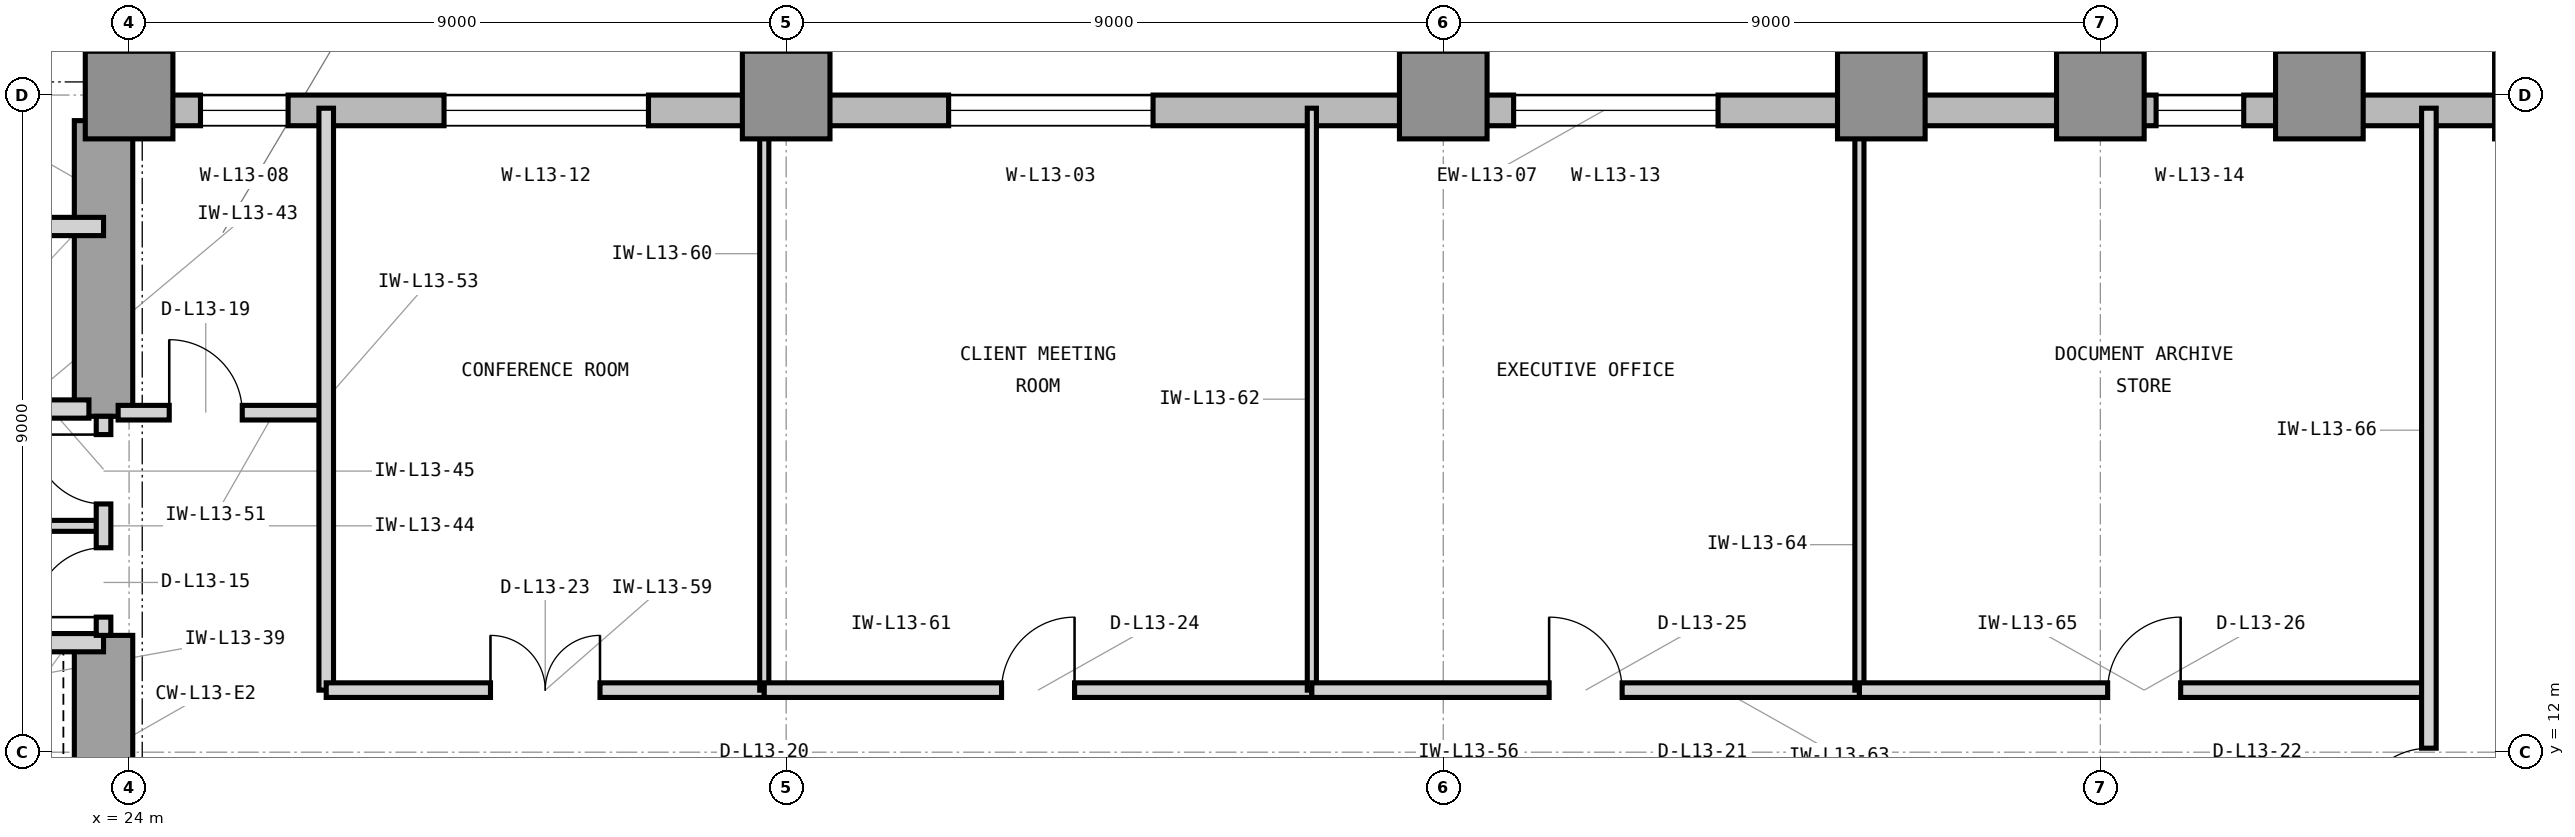
"""IFC4 building model, lengths in metres.
Left out: names, types, materials, properties, quantities, classifications, styles, units other than length and angle.
Written with IfcOpenShell. Run it as: python <this file> out.ifc"""

import sys

from ifc_helpers import new_model, si_unit, direction, frame, frame_2d, origin, origin_2d, place, context, subcontext, project, spatial, rectangle, extrude, element, fill, save


model = new_model("IFC4")
c1 = context("Model", 3, precision=1e-05, world=origin(), true_north=direction((0.0, 1.0)))
c2 = subcontext(c1, "Body", "Model", "MODEL_VIEW")
j1 = project(units=[si_unit("LENGTHUNIT", "METRE"), si_unit("PLANEANGLEUNIT", "RADIAN")], contexts=[c1])
p1 = place(None, origin())
s1 = spatial("IfcSite", under=j1, at=p1, CompositionType="ELEMENT")
p2 = place(p1, origin())
s2 = spatial("IfcBuilding", under=s1, at=p2, CompositionType="ELEMENT")
p3 = place(p2, frame((0.0, 0.0, 59.4)))
s3 = spatial("IfcBuildingStorey", under=s2, at=p3, CompositionType="ELEMENT", Elevation=59.4)
p4 = place(p3, frame((23.65, 10.4, 0.0), z_axis=(0.0, 0.0, 1.0), x_axis=(0.0, 1.0, 0.0)))
e1 = element("IfcWall", 1, at=p4, inside=s3, PredefinedType="SHEAR", context=c2, shape_type="SweptSolid", body=[
    extrude(rectangle(XDim=3.2, YDim=0.8, at=frame_2d((1.6, 0.0))), origin(), (0.0, 0.0, 1.0), 4.2),
])
p5 = place(p3, frame((23.65, 16.6, 0.0), z_axis=(0.0, 0.0, 1.0), x_axis=(0.0, 1.0, 0.0)))
e2 = element("IfcWall", 2, at=p5, inside=s3, PredefinedType="SHEAR", context=c2, shape_type="SweptSolid", body=[
    extrude(rectangle(XDim=4.05, YDim=0.8, at=frame_2d((2.025, 0.0))), origin(), (0.0, 0.0, 1.0), 4.2),
])
for number, where, z_axis, x_axis in (
    (3, (24.0, 21.0, 0.0), (0.0, 0.0, 1.0), (1.0, 0.0, 0.0)),
    (4, (33.0, 21.0, 0.0), (0.0, 0.0, 1.0), (1.0, 0.0, 0.0)),
    (5, (42.0, 21.0, 0.0), (0.0, 0.0, 1.0), (1.0, 0.0, 0.0)),
    (6, (48.0, 21.0, 0.0), (0.0, 0.0, 1.0), (1.0, 0.0, 0.0)),
    (7, (51.0, 21.0, 0.0), (0.0, 0.0, 1.0), (1.0, 0.0, 0.0)),
    (8, (54.0, 21.0, 0.0), (0.0, 0.0, 1.0), (1.0, 0.0, 0.0)),
    (9, (57.0, 21.0, 0.0), (0.0, 0.0, 1.0), (1.0, 0.0, 0.0)),
):
    element("IfcColumn", number, at=place(p3, frame(where, z_axis=z_axis, x_axis=x_axis)), inside=s3, PredefinedType="COLUMN", context=c2, shape_type="SweptSolid", body=[
        extrude(rectangle(XDim=1.2, YDim=1.2, at=origin_2d()), origin(), (0.0, 0.0, 1.0), 4.2),
    ])
p6 = place(p3, frame((64.4, 20.79, 0.0), z_axis=(0.0, 0.0, 1.0), x_axis=(-1.0, 0.0, 0.0)))
e10 = element("IfcWall", 10, at=p6, inside=s3, PredefinedType="STANDARD", context=c2, shape_type="SweptSolid", body=[
    extrude(rectangle(XDim=40.4, YDim=0.42, at=frame_2d((20.2, 0.0))), origin(), (0.0, 0.0, 1.0), 3.98),
])
p7 = place(p6, frame((26.375, 0.0, 0.85)))
e11 = element("IfcOpeningElement", 11, at=p7, cuts=e10, PredefinedType="OPENING", context=c2, shape_type="SweptSolid", body=[
    extrude(rectangle(XDim=2.8, YDim=2.45, at=frame_2d((1.4, 1.225))), frame((0.0, 0.22, 0.0), z_axis=(0.0, -1.0, 0.0), x_axis=(1.0, 0.0, 0.0)), (0.0, 0.0, 1.0), 0.44),
])
p8 = place(p6, frame((38.222, 0.0, 0.85)))
e12 = element("IfcOpeningElement", 12, at=p8, cuts=e10, PredefinedType="OPENING", context=c2, shape_type="SweptSolid", body=[
    extrude(rectangle(XDim=1.2, YDim=2.45, at=frame_2d((0.6, 1.225))), frame((0.0, 0.22, 0.0), z_axis=(0.0, -1.0, 0.0), x_axis=(1.0, 0.0, 0.0)), (0.0, 0.0, 1.0), 0.44),
])
p9 = place(p6, frame((33.286, 0.0, 0.85)))
e13 = element("IfcOpeningElement", 13, at=p9, cuts=e10, PredefinedType="OPENING", context=c2, shape_type="SweptSolid", body=[
    extrude(rectangle(XDim=2.8, YDim=2.45, at=frame_2d((1.4, 1.225))), frame((0.0, 0.22, 0.0), z_axis=(0.0, -1.0, 0.0), x_axis=(1.0, 0.0, 0.0)), (0.0, 0.0, 1.0), 0.44),
])
p10 = place(p6, frame((18.636, 0.0, 0.85)))
e14 = element("IfcOpeningElement", 14, at=p10, cuts=e10, PredefinedType="OPENING", context=c2, shape_type="SweptSolid", body=[
    extrude(rectangle(XDim=2.8, YDim=2.45, at=frame_2d((1.4, 1.225))), frame((0.0, 0.22, 0.0), z_axis=(0.0, -1.0, 0.0), x_axis=(1.0, 0.0, 0.0)), (0.0, 0.0, 1.0), 0.44),
])
p11 = place(p6, frame((11.436, 0.0, 0.85)))
e15 = element("IfcOpeningElement", 15, at=p11, cuts=e10, PredefinedType="OPENING", context=c2, shape_type="SweptSolid", body=[
    extrude(rectangle(XDim=1.2, YDim=2.45, at=frame_2d((0.6, 1.225))), frame((0.0, 0.22, 0.0), z_axis=(0.0, -1.0, 0.0), x_axis=(1.0, 0.0, 0.0)), (0.0, 0.0, 1.0), 0.44),
])
p12 = place(p3, frame((23.79, 21.0, 0.0), z_axis=(0.0, 0.0, 1.0), x_axis=(0.0, 1.0, 0.0)))
e16 = element("IfcWall", 16, at=p12, inside=s3, PredefinedType="STANDARD", context=c2, shape_type="SweptSolid", body=[
    extrude(rectangle(XDim=28.4, YDim=0.42, at=frame_2d((14.2, 0.0))), origin(), (0.0, 0.0, 1.0), 3.98),
])
p13 = place(p12, frame((10.433, 0.0, 0.85)))
e17 = element("IfcOpeningElement", 17, at=p13, cuts=e16, PredefinedType="OPENING", context=c2, shape_type="SweptSolid", body=[
    extrude(rectangle(XDim=2.8, YDim=2.45, at=frame_2d((1.4, 1.225))), frame((0.0, 0.22, 0.0), z_axis=(0.0, -1.0, 0.0), x_axis=(1.0, 0.0, 0.0)), (0.0, 0.0, 1.0), 0.44),
])
p14 = place(p3, frame((21.05, 16.7, 0.0), z_axis=(0.0, 0.0, 1.0), x_axis=(1.0, 0.0, 0.0)))
e18 = element("IfcWall", 18, at=p14, inside=s3, PredefinedType="PARTITIONING", context=c2, shape_type="SweptSolid", body=[
    extrude(rectangle(XDim=2.4, YDim=0.25, at=frame_2d((1.2, 0.0))), origin(), (0.0, 0.0, 1.0), 3.426),
])
p15 = place(p3, frame((16.45, 19.2, 0.0), z_axis=(0.0, 0.0, 1.0), x_axis=(1.0, 0.0, 0.0)))
e19 = element("IfcWall", 19, at=p15, inside=s3, PredefinedType="PARTITIONING", context=c2, shape_type="SweptSolid", body=[
    extrude(rectangle(XDim=7.2, YDim=0.25, at=frame_2d((3.6, 0.0))), origin(), (0.0, 0.0, 1.0), 3.97),
])
p16 = place(p3, frame((14.7, 13.5, 0.0), z_axis=(0.0, 0.0, 1.0), x_axis=(1.0, 0.0, 0.0)))
e20 = element("IfcWall", 20, at=p16, inside=s3, PredefinedType="PARTITIONING", context=c2, shape_type="SweptSolid", body=[
    extrude(rectangle(XDim=8.95, YDim=0.25, at=frame_2d((4.475, 0.0))), origin(), (0.0, 0.0, 1.0), 3.426),
])
p17 = place(p3, frame((19.65, 15.1, 0.0), z_axis=(0.0, 0.0, 1.0), x_axis=(1.0, 0.0, 0.0)))
e21 = element("IfcWall", 21, at=p17, inside=s3, PredefinedType="PARTITIONING", context=c2, shape_type="SweptSolid", body=[
    extrude(rectangle(XDim=4.0, YDim=0.15, at=frame_2d((2.0, 0.0))), origin(), (0.0, 0.0, 1.0), 3.97),
])
p18 = place(p3, frame((23.65, 13.6, 0.0), z_axis=(0.0, 0.0, 1.0), x_axis=(0.0, 1.0, 0.0)))
e22 = element("IfcWall", 22, at=p18, inside=s3, PredefinedType="PARTITIONING", context=c2, shape_type="SweptSolid", body=[
    extrude(rectangle(XDim=3.0, YDim=0.2, at=frame_2d((1.5, 0.0))), origin(), (0.0, 0.0, 1.0), 3.97),
])
p19 = place(p18, frame((0.25, 0.0, 0.0)))
e23 = element("IfcOpeningElement", 23, at=p19, cuts=e22, PredefinedType="OPENING", context=c2, shape_type="SweptSolid", body=[
    extrude(rectangle(XDim=0.95, YDim=2.1, at=frame_2d((0.475, 1.05))), frame((0.0, 0.11, 0.0), z_axis=(0.0, -1.0, 0.0), x_axis=(1.0, 0.0, 0.0)), (0.0, 0.0, 1.0), 0.22),
])
p20 = place(p18, frame((1.8, 0.0, 0.0)))
e24 = element("IfcOpeningElement", 24, at=p20, cuts=e22, PredefinedType="OPENING", context=c2, shape_type="SweptSolid", body=[
    extrude(rectangle(XDim=0.95, YDim=2.1, at=frame_2d((0.475, 1.05))), frame((0.0, 0.11, 0.0), z_axis=(0.0, -1.0, 0.0), x_axis=(1.0, 0.0, 0.0)), (0.0, 0.0, 1.0), 0.22),
])
p21 = place(p3, frame((23.85, 16.65, 0.0), z_axis=(0.0, 0.0, 1.0), x_axis=(1.0, 0.0, 0.0)))
e25 = element("IfcWall", 25, at=p21, inside=s3, PredefinedType="PARTITIONING", context=c2, shape_type="SweptSolid", body=[
    extrude(rectangle(XDim=2.85, YDim=0.2, at=frame_2d((1.425, 0.0))), origin(), (0.0, 0.0, 1.0), 3.97),
])
p22 = place(p21, frame((0.7, 0.0, 0.0)))
e26 = element("IfcOpeningElement", 26, at=p22, cuts=e25, PredefinedType="OPENING", context=c2, shape_type="SweptSolid", body=[
    extrude(rectangle(XDim=1.0, YDim=2.15, at=frame_2d((0.5, 1.075))), frame((0.0, 0.11, 0.0), z_axis=(0.0, -1.0, 0.0), x_axis=(1.0, 0.0, 0.0)), (0.0, 0.0, 1.0), 0.22),
])
p23 = place(p3, frame((26.7, 12.85, 0.0), z_axis=(0.0, 0.0, 1.0), x_axis=(0.0, 1.0, 0.0)))
e27 = element("IfcWall", 27, at=p23, inside=s3, PredefinedType="PARTITIONING", context=c2, shape_type="SweptSolid", body=[
    extrude(rectangle(XDim=7.97, YDim=0.2, at=frame_2d((3.985, 0.0))), origin(), (0.0, 0.0, 1.0), 3.97),
])
p24 = place(p3, frame((26.7, 12.85, 0.0), z_axis=(0.0, 0.0, 1.0), x_axis=(1.0, 0.0, 0.0)))
e28 = element("IfcWall", 28, at=p24, inside=s3, PredefinedType="PARTITIONING", context=c2, shape_type="SweptSolid", body=[
    extrude(rectangle(XDim=6.0, YDim=0.2, at=frame_2d((3.0, 0.0))), origin(), (0.0, 0.0, 1.0), 3.97),
])
p25 = place(p24, frame((2.25, 0.0, 0.0)))
e29 = element("IfcOpeningElement", 29, at=p25, cuts=e28, PredefinedType="OPENING", context=c2, shape_type="SweptSolid", body=[
    extrude(rectangle(XDim=1.5, YDim=2.3, at=frame_2d((0.75, 1.15))), frame((0.0, 0.11, 0.0), z_axis=(0.0, -1.0, 0.0), x_axis=(1.0, 0.0, 0.0)), (0.0, 0.0, 1.0), 0.22),
])
p26 = place(p3, frame((32.7, 12.85, 0.0), z_axis=(0.0, 0.0, 1.0), x_axis=(0.0, 1.0, 0.0)))
e30 = element("IfcWall", 30, at=p26, inside=s3, PredefinedType="PARTITIONING", context=c2, shape_type="SweptSolid", body=[
    extrude(rectangle(XDim=7.97, YDim=0.125, at=frame_2d((3.985, 0.0))), origin(), (0.0, 0.0, 1.0), 3.97),
])
p27 = place(p3, frame((32.7, 12.85, 0.0), z_axis=(0.0, 0.0, 1.0), x_axis=(1.0, 0.0, 0.0)))
e31 = element("IfcWall", 31, at=p27, inside=s3, PredefinedType="PARTITIONING", context=c2, shape_type="SweptSolid", body=[
    extrude(rectangle(XDim=7.5, YDim=0.2, at=frame_2d((3.75, 0.0))), origin(), (0.0, 0.0, 1.0), 3.97),
])
p28 = place(p27, frame((3.25, 0.0, 0.0)))
e32 = element("IfcOpeningElement", 32, at=p28, cuts=e31, PredefinedType="OPENING", context=c2, shape_type="SweptSolid", body=[
    extrude(rectangle(XDim=1.0, YDim=2.15, at=frame_2d((0.5, 1.075))), frame((0.0, 0.11, 0.0), z_axis=(0.0, -1.0, 0.0), x_axis=(1.0, 0.0, 0.0)), (0.0, 0.0, 1.0), 0.22),
])
p29 = place(p3, frame((40.2, 12.85, 0.0), z_axis=(0.0, 0.0, 1.0), x_axis=(0.0, 1.0, 0.0)))
e33 = element("IfcWall", 33, at=p29, inside=s3, PredefinedType="PARTITIONING", context=c2, shape_type="SweptSolid", body=[
    extrude(rectangle(XDim=7.97, YDim=0.125, at=frame_2d((3.985, 0.0))), origin(), (0.0, 0.0, 1.0), 3.97),
])
p30 = place(p3, frame((40.2, 12.85, 0.0), z_axis=(0.0, 0.0, 1.0), x_axis=(1.0, 0.0, 0.0)))
e34 = element("IfcWall", 34, at=p30, inside=s3, PredefinedType="PARTITIONING", context=c2, shape_type="SweptSolid", body=[
    extrude(rectangle(XDim=7.5, YDim=0.2, at=frame_2d((3.75, 0.0))), origin(), (0.0, 0.0, 1.0), 3.97),
])
p31 = place(p30, frame((3.25, 0.0, 0.0)))
e35 = element("IfcOpeningElement", 35, at=p31, cuts=e34, PredefinedType="OPENING", context=c2, shape_type="SweptSolid", body=[
    extrude(rectangle(XDim=1.0, YDim=2.15, at=frame_2d((0.5, 1.075))), frame((0.0, 0.11, 0.0), z_axis=(0.0, -1.0, 0.0), x_axis=(1.0, 0.0, 0.0)), (0.0, 0.0, 1.0), 0.22),
])
p32 = place(p3, frame((47.7, 12.85, 0.0), z_axis=(0.0, 0.0, 1.0), x_axis=(0.0, 1.0, 0.0)))
e36 = element("IfcWall", 36, at=p32, inside=s3, PredefinedType="PARTITIONING", context=c2, shape_type="SweptSolid", body=[
    extrude(rectangle(XDim=7.97, YDim=0.125, at=frame_2d((3.985, 0.0))), origin(), (0.0, 0.0, 1.0), 3.97),
])
p33 = place(p3, frame((47.7, 12.85, 0.0), z_axis=(0.0, 0.0, 1.0), x_axis=(1.0, 0.0, 0.0)))
e37 = element("IfcWall", 37, at=p33, inside=s3, PredefinedType="PARTITIONING", context=c2, shape_type="SweptSolid", body=[
    extrude(rectangle(XDim=7.8, YDim=0.2, at=frame_2d((3.9, 0.0))), origin(), (0.0, 0.0, 1.0), 3.97),
])
p34 = place(p33, frame((3.4, 0.0, 0.0)))
e38 = element("IfcOpeningElement", 38, at=p34, cuts=e37, PredefinedType="OPENING", context=c2, shape_type="SweptSolid", body=[
    extrude(rectangle(XDim=1.0, YDim=2.15, at=frame_2d((0.5, 1.075))), frame((0.0, 0.11, 0.0), z_axis=(0.0, -1.0, 0.0), x_axis=(1.0, 0.0, 0.0)), (0.0, 0.0, 1.0), 0.22),
])
p35 = place(p3, frame((55.5, 3.18, 0.0), z_axis=(0.0, 0.0, 1.0), x_axis=(0.0, 1.0, 0.0)))
e39 = element("IfcWall", 39, at=p35, inside=s3, PredefinedType="PARTITIONING", context=c2, shape_type="SweptSolid", body=[
    extrude(rectangle(XDim=17.64, YDim=0.2, at=frame_2d((8.82, 0.0))), origin(), (0.0, 0.0, 1.0), 3.97),
])
p36 = place(p35, frame((7.875, 0.0, 0.0)))
e40 = element("IfcOpeningElement", 40, at=p36, cuts=e39, PredefinedType="OPENING", context=c2, shape_type="SweptSolid", body=[
    extrude(rectangle(XDim=1.0, YDim=2.15, at=frame_2d((0.5, 1.075))), frame((0.0, 0.11, 0.0), z_axis=(0.0, -1.0, 0.0), x_axis=(1.0, 0.0, 0.0)), (0.0, 0.0, 1.0), 0.22),
])
p37 = place(p7, origin())
e41 = element("IfcWindow", 41, at=p37, inside=s3, PartitioningType="SINGLE_PANEL", PredefinedType="WINDOW", context=c2, shape_type="SweptSolid", body=[
    extrude(rectangle(XDim=2.8, YDim=2.45, at=frame_2d((1.4, 1.225))), frame((0.0, 0.11, 0.0), z_axis=(0.0, -1.0, 0.0), x_axis=(1.0, 0.0, 0.0)), (0.0, 0.0, 1.0), 0.06),
])
fill(e11, e41)
p38 = place(p19, origin())
e42 = element("IfcDoor", 42, at=p38, inside=s3, OperationType="SINGLE_SWING_LEFT", PredefinedType="DOOR", context=c2, shape_type="SweptSolid", body=[
    extrude(rectangle(XDim=0.95, YDim=2.1, at=frame_2d((0.475, 1.05))), frame((0.0, 0.025, 0.0), z_axis=(0.0, -1.0, 0.0), x_axis=(1.0, 0.0, 0.0)), (0.0, 0.0, 1.0), 0.05),
])
fill(e23, e42)
p39 = place(p20, origin())
e43 = element("IfcDoor", 43, at=p39, inside=s3, OperationType="SINGLE_SWING_RIGHT", PredefinedType="DOOR", context=c2, shape_type="SweptSolid", body=[
    extrude(rectangle(XDim=0.95, YDim=2.1, at=frame_2d((0.475, 1.05))), frame((0.0, 0.025, 0.0), z_axis=(0.0, -1.0, 0.0), x_axis=(1.0, 0.0, 0.0)), (0.0, 0.0, 1.0), 0.05),
])
fill(e24, e43)
p40 = place(p22, origin())
e44 = element("IfcDoor", 44, at=p40, inside=s3, OperationType="SINGLE_SWING_LEFT", PredefinedType="DOOR", context=c2, shape_type="SweptSolid", body=[
    extrude(rectangle(XDim=1.0, YDim=2.15, at=frame_2d((0.5, 1.075))), frame((0.0, 0.025, 0.0), z_axis=(0.0, -1.0, 0.0), x_axis=(1.0, 0.0, 0.0)), (0.0, 0.0, 1.0), 0.05),
])
fill(e26, e44)
p41 = place(p25, origin())
e45 = element("IfcDoor", 45, at=p41, inside=s3, OperationType="DOUBLE_DOOR_SINGLE_SWING", PredefinedType="DOOR", context=c2, shape_type="SweptSolid", body=[
    extrude(rectangle(XDim=1.5, YDim=2.3, at=frame_2d((0.75, 1.15))), frame((0.0, 0.025, 0.0), z_axis=(0.0, -1.0, 0.0), x_axis=(1.0, 0.0, 0.0)), (0.0, 0.0, 1.0), 0.05),
])
fill(e29, e45)
p42 = place(p28, origin())
e46 = element("IfcDoor", 46, at=p42, inside=s3, OperationType="SINGLE_SWING_RIGHT", PredefinedType="DOOR", context=c2, shape_type="SweptSolid", body=[
    extrude(rectangle(XDim=1.0, YDim=2.15, at=frame_2d((0.5, 1.075))), frame((0.0, 0.025, 0.0), z_axis=(0.0, -1.0, 0.0), x_axis=(1.0, 0.0, 0.0)), (0.0, 0.0, 1.0), 0.05),
])
fill(e32, e46)
p43 = place(p31, origin())
e47 = element("IfcDoor", 47, at=p43, inside=s3, OperationType="SINGLE_SWING_LEFT", PredefinedType="DOOR", context=c2, shape_type="SweptSolid", body=[
    extrude(rectangle(XDim=1.0, YDim=2.15, at=frame_2d((0.5, 1.075))), frame((0.0, 0.025, 0.0), z_axis=(0.0, -1.0, 0.0), x_axis=(1.0, 0.0, 0.0)), (0.0, 0.0, 1.0), 0.05),
])
fill(e35, e47)
p44 = place(p34, origin())
e48 = element("IfcDoor", 48, at=p44, inside=s3, OperationType="SINGLE_SWING_RIGHT", PredefinedType="DOOR", context=c2, shape_type="SweptSolid", body=[
    extrude(rectangle(XDim=1.0, YDim=2.15, at=frame_2d((0.5, 1.075))), frame((0.0, 0.025, 0.0), z_axis=(0.0, -1.0, 0.0), x_axis=(1.0, 0.0, 0.0)), (0.0, 0.0, 1.0), 0.05),
])
fill(e38, e48)
p45 = place(p36, origin())
e49 = element("IfcDoor", 49, at=p45, inside=s3, OperationType="SINGLE_SWING_LEFT", PredefinedType="DOOR", context=c2, shape_type="SweptSolid", body=[
    extrude(rectangle(XDim=1.0, YDim=2.15, at=frame_2d((0.5, 1.075))), frame((0.0, 0.025, 0.0), z_axis=(0.0, -1.0, 0.0), x_axis=(1.0, 0.0, 0.0)), (0.0, 0.0, 1.0), 0.05),
])
fill(e40, e49)
p46 = place(p8, origin())
e50 = element("IfcWindow", 50, at=p46, inside=s3, PartitioningType="SINGLE_PANEL", PredefinedType="WINDOW", context=c2, shape_type="SweptSolid", body=[
    extrude(rectangle(XDim=1.2, YDim=2.45, at=frame_2d((0.6, 1.225))), frame((0.0, 0.11, 0.0), z_axis=(0.0, -1.0, 0.0), x_axis=(1.0, 0.0, 0.0)), (0.0, 0.0, 1.0), 0.06),
])
fill(e12, e50)
p47 = place(p9, origin())
e51 = element("IfcWindow", 51, at=p47, inside=s3, PartitioningType="SINGLE_PANEL", PredefinedType="WINDOW", context=c2, shape_type="SweptSolid", body=[
    extrude(rectangle(XDim=2.8, YDim=2.45, at=frame_2d((1.4, 1.225))), frame((0.0, 0.11, 0.0), z_axis=(0.0, -1.0, 0.0), x_axis=(1.0, 0.0, 0.0)), (0.0, 0.0, 1.0), 0.06),
])
fill(e13, e51)
p48 = place(p10, origin())
e52 = element("IfcWindow", 52, at=p48, inside=s3, PartitioningType="SINGLE_PANEL", PredefinedType="WINDOW", context=c2, shape_type="SweptSolid", body=[
    extrude(rectangle(XDim=2.8, YDim=2.45, at=frame_2d((1.4, 1.225))), frame((0.0, 0.11, 0.0), z_axis=(0.0, -1.0, 0.0), x_axis=(1.0, 0.0, 0.0)), (0.0, 0.0, 1.0), 0.06),
])
fill(e14, e52)
p49 = place(p11, origin())
e53 = element("IfcWindow", 53, at=p49, inside=s3, PartitioningType="SINGLE_PANEL", PredefinedType="WINDOW", context=c2, shape_type="SweptSolid", body=[
    extrude(rectangle(XDim=1.2, YDim=2.45, at=frame_2d((0.6, 1.225))), frame((0.0, 0.11, 0.0), z_axis=(0.0, -1.0, 0.0), x_axis=(1.0, 0.0, 0.0)), (0.0, 0.0, 1.0), 0.06),
])
fill(e15, e53)
save(model, sys.argv[1])
